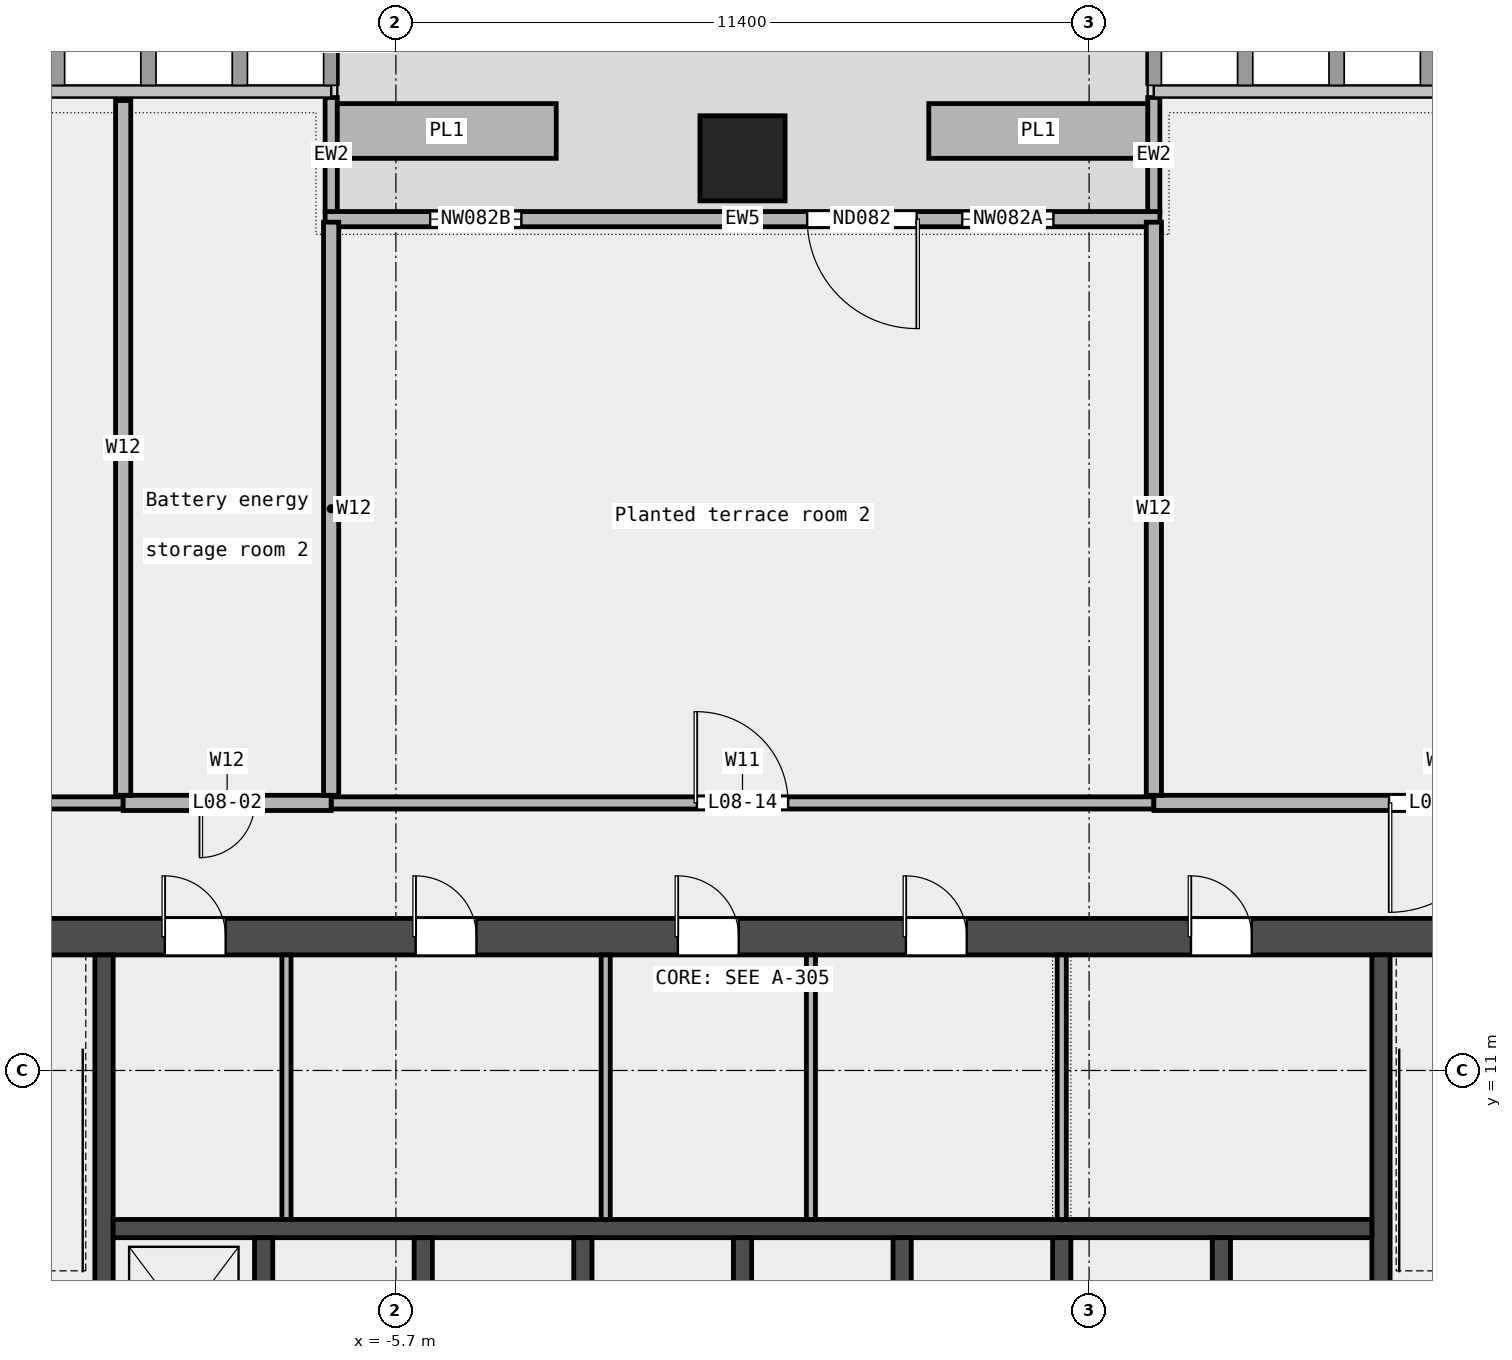
"""IFC4 building model, lengths in metres.
Left out: names, types, materials, properties, quantities, classifications, styles, units other than length and angle.
Written with IfcOpenShell. Run it as: python <this file> out.ifc"""

import sys

from ifc_helpers import new_model, si_unit, direction, frame, frame_2d, origin, origin_2d, place, context, subcontext, project, spatial, rectangle, extrude, element, fill, save


model = new_model("IFC4")
c1 = context("Model", 3, precision=1e-05, world=origin(), true_north=direction((0.0, 1.0)))
c2 = subcontext(c1, "Body", "Model", "MODEL_VIEW")
j1 = project(units=[si_unit("LENGTHUNIT", "METRE"), si_unit("PLANEANGLEUNIT", "RADIAN")], contexts=[c1])
p1 = place(None, origin())
s1 = spatial("IfcSite", under=j1, at=p1, CompositionType="ELEMENT")
p2 = place(p1, origin())
s2 = spatial("IfcBuilding", under=s1, at=p2, CompositionType="ELEMENT")
p3 = place(p2, frame((0.0, 0.0, 45.4)))
s3 = spatial("IfcBuildingStorey", under=s2, at=p3, CompositionType="ELEMENT", Elevation=45.4)
p4 = place(p3, frame((0.0, 26.0, 0.0), z_axis=(0.0, 0.0, 1.0), x_axis=(1.0, 0.0, 0.0)))
e1 = element("IfcColumn", 1, at=p4, inside=s3, PredefinedType="COLUMN", context=c2, shape_type="SweptSolid", body=[
    extrude(rectangle(XDim=1.4, YDim=1.4, at=origin_2d()), origin(), (0.0, 0.0, 1.0), 4.35),
])
p5 = place(p3, frame((6.864, 25.0, 0.0), z_axis=(0.0, 0.0, 1.0), x_axis=(-1.0, 0.0, 0.0)))
e2 = element("IfcWall", 2, at=p5, inside=s3, PredefinedType="STANDARD", context=c2, shape_type="SweptSolid", body=[
    extrude(rectangle(XDim=13.727, YDim=0.25, at=frame_2d((6.864, 0.0))), origin(), (0.0, 0.0, 1.0), 4.35),
])
p6 = place(p5, frame((1.75, 0.0, 0.45)))
e3 = element("IfcOpeningElement", 3, at=p6, cuts=e2, PredefinedType="OPENING", context=c2, shape_type="SweptSolid", body=[
    extrude(rectangle(XDim=1.5, YDim=3.0, at=frame_2d((0.75, 1.5))), frame((0.0, 0.137, 0.0), z_axis=(0.0, -1.0, 0.0), x_axis=(1.0, 0.0, 0.0)), (0.0, 0.0, 1.0), 0.274),
])
p7 = place(p5, frame((4.0, 0.0, 0.0)))
e4 = element("IfcOpeningElement", 4, at=p7, cuts=e2, PredefinedType="OPENING", context=c2, shape_type="SweptSolid", body=[
    extrude(rectangle(XDim=1.8, YDim=2.4, at=frame_2d((0.9, 1.2))), frame((0.0, 0.137, 0.0), z_axis=(0.0, -1.0, 0.0), x_axis=(1.0, 0.0, 0.0)), (0.0, 0.0, 1.0), 0.274),
])
p8 = place(p5, frame((10.5, 0.0, 0.45)))
e5 = element("IfcOpeningElement", 5, at=p8, cuts=e2, PredefinedType="OPENING", context=c2, shape_type="SweptSolid", body=[
    extrude(rectangle(XDim=1.5, YDim=3.0, at=frame_2d((0.75, 1.5))), frame((0.0, 0.137, 0.0), z_axis=(0.0, -1.0, 0.0), x_axis=(1.0, 0.0, 0.0)), (0.0, 0.0, 1.0), 0.274),
])
for number, where, z_axis, x_axis in (
    (6, (6.764, 27.0, 0.0), (0.0, 0.0, 1.0), (0.0, -1.0, 0.0)),
    (7, (-6.764, 27.0, 0.0), (0.0, 0.0, 1.0), (0.0, -1.0, 0.0)),
):
    element("IfcWall", number, at=place(p3, frame(where, z_axis=z_axis, x_axis=x_axis)), inside=s3, PredefinedType="STANDARD", context=c2, shape_type="SweptSolid", body=[
        extrude(rectangle(XDim=1.875, YDim=0.2, at=frame_2d((0.938, 0.0))), origin(), (0.0, 0.0, 1.0), 4.35),
    ])
for number, where, z_axis, x_axis in (
    (8, (6.664, 26.45, 0.0), (0.0, 0.0, 1.0), (-1.0, 0.0, 0.0)),
    (9, (-3.064, 26.45, 0.0), (0.0, 0.0, 1.0), (-1.0, 0.0, 0.0)),
):
    element("IfcWall", number, at=place(p3, frame(where, z_axis=z_axis, x_axis=x_axis)), inside=s3, PredefinedType="STANDARD", context=c2, shape_type="SweptSolid", body=[
        extrude(rectangle(XDim=3.6, YDim=0.9, at=frame_2d((1.8, 0.0))), origin(), (0.0, 0.0, 1.0), 0.7),
    ])
p9 = place(p3, frame((-16.3, 15.4, 0.0), z_axis=(0.0, 0.0, 1.0), x_axis=(1.0, 0.0, 0.0)))
e10 = element("IfcWall", 10, at=p9, inside=s3, PredefinedType="PARTITIONING", context=c2, shape_type="SweptSolid", body=[
    extrude(rectangle(XDim=6.115, YDim=0.2, at=frame_2d((3.058, 0.0))), origin(), (0.0, 0.0, 1.0), 4.35),
])
p10 = place(p9, frame((2.157, 0.0, 0.0)))
e11 = element("IfcOpeningElement", 11, at=p10, cuts=e10, PredefinedType="OPENING", context=c2, shape_type="SweptSolid", body=[
    extrude(rectangle(XDim=1.8, YDim=2.1, at=frame_2d((0.9, 1.05))), frame((0.0, 0.112, 0.0), z_axis=(0.0, -1.0, 0.0), x_axis=(1.0, 0.0, 0.0)), (0.0, 0.0, 1.0), 0.224),
])
p11 = place(p3, frame((-6.765, 15.4, 0.0), z_axis=(0.0, 0.0, 1.0), x_axis=(1.0, 0.0, 0.0)))
e12 = element("IfcWall", 12, at=p11, inside=s3, PredefinedType="PARTITIONING", context=c2, shape_type="SweptSolid", body=[
    extrude(rectangle(XDim=13.53, YDim=0.2, at=frame_2d((6.765, 0.0))), origin(), (0.0, 0.0, 1.0), 4.35),
])
p12 = place(p11, frame((6.015, 0.0, 0.0)))
e13 = element("IfcOpeningElement", 13, at=p12, cuts=e12, PredefinedType="OPENING", context=c2, shape_type="SweptSolid", body=[
    extrude(rectangle(XDim=1.5, YDim=2.1, at=frame_2d((0.75, 1.05))), frame((0.0, 0.112, 0.0), z_axis=(0.0, -1.0, 0.0), x_axis=(1.0, 0.0, 0.0)), (0.0, 0.0, 1.0), 0.224),
])
p13 = place(p3, frame((-10.185, 15.4, 0.0), z_axis=(0.0, 0.0, 1.0), x_axis=(1.0, 0.0, 0.0)))
e14 = element("IfcWall", 14, at=p13, inside=s3, PredefinedType="PARTITIONING", context=c2, shape_type="SweptSolid", body=[
    extrude(rectangle(XDim=3.42, YDim=0.25, at=frame_2d((1.71, 0.0))), origin(), (0.0, 0.0, 1.0), 4.35),
])
p14 = place(p13, frame((1.26, 0.0, 0.0)))
e15 = element("IfcOpeningElement", 15, at=p14, cuts=e14, PredefinedType="OPENING", context=c2, shape_type="SweptSolid", body=[
    extrude(rectangle(XDim=0.9, YDim=2.1, at=frame_2d((0.45, 1.05))), frame((0.0, 0.137, 0.0), z_axis=(0.0, -1.0, 0.0), x_axis=(1.0, 0.0, 0.0)), (0.0, 0.0, 1.0), 0.274),
])
p15 = place(p3, frame((6.765, 15.4, 0.0), z_axis=(0.0, 0.0, 1.0), x_axis=(1.0, 0.0, 0.0)))
e16 = element("IfcWall", 16, at=p15, inside=s3, PredefinedType="PARTITIONING", context=c2, shape_type="SweptSolid", body=[
    extrude(rectangle(XDim=9.535, YDim=0.25, at=frame_2d((4.768, 0.0))), origin(), (0.0, 0.0, 1.0), 4.35),
])
p16 = place(p15, frame((3.867, 0.0, 0.0)))
e17 = element("IfcOpeningElement", 17, at=p16, cuts=e16, PredefinedType="OPENING", context=c2, shape_type="SweptSolid", body=[
    extrude(rectangle(XDim=1.8, YDim=2.1, at=frame_2d((0.9, 1.05))), frame((0.0, 0.137, 0.0), z_axis=(0.0, -1.0, 0.0), x_axis=(1.0, 0.0, 0.0)), (0.0, 0.0, 1.0), 0.274),
])
p17 = place(p3, frame((-10.185, 15.525, 0.0), z_axis=(0.0, 0.0, 1.0), x_axis=(0.0, 1.0, 0.0)))
e18 = element("IfcWall", 18, at=p17, inside=s3, PredefinedType="PARTITIONING", context=c2, shape_type="SweptSolid", body=[
    extrude(rectangle(XDim=11.425, YDim=0.25, at=frame_2d((5.712, 0.0))), origin(), (0.0, 0.0, 1.0), 4.35),
])
for number, where, z_axis, x_axis in (
    (19, (-6.765, 15.525, 0.0), (0.0, 0.0, 1.0), (0.0, 1.0, 0.0)),
    (20, (6.765, 15.525, 0.0), (0.0, 0.0, 1.0), (0.0, 1.0, 0.0)),
):
    element("IfcWall", number, at=place(p3, frame(where, z_axis=z_axis, x_axis=x_axis)), inside=s3, PredefinedType="PARTITIONING", context=c2, shape_type="SweptSolid", body=[
        extrude(rectangle(XDim=9.425, YDim=0.25, at=frame_2d((4.712, 0.0))), origin(), (0.0, 0.0, 1.0), 4.35),
    ])
p18 = place(p3, frame((-14.4, 13.2, 0.0), z_axis=(0.0, 0.0, 1.0), x_axis=(1.0, 0.0, 0.0)))
e21 = element("IfcWall", 21, at=p18, inside=s3, PredefinedType="SHEAR", context=c2, shape_type="SweptSolid", body=[
    extrude(rectangle(XDim=28.8, YDim=0.6, at=frame_2d((14.4, 0.0))), origin(), (0.0, 0.0, 1.0), 4.5),
])
p19 = place(p18, frame((4.9, 0.0, 0.0)))
e22 = element("IfcOpeningElement", 22, at=p19, cuts=e21, PredefinedType="OPENING", context=c2, shape_type="SweptSolid", body=[
    extrude(rectangle(XDim=1.0, YDim=2.1, at=frame_2d((0.5, 1.05))), frame((0.0, 0.312, 0.0), z_axis=(0.0, -1.0, 0.0), x_axis=(1.0, 0.0, 0.0)), (0.0, 0.0, 1.0), 0.624),
])
p20 = place(p18, frame((9.025, 0.0, 0.0)))
e23 = element("IfcOpeningElement", 23, at=p20, cuts=e21, PredefinedType="OPENING", context=c2, shape_type="SweptSolid", body=[
    extrude(rectangle(XDim=1.0, YDim=2.1, at=frame_2d((0.5, 1.05))), frame((0.0, 0.312, 0.0), z_axis=(0.0, -1.0, 0.0), x_axis=(1.0, 0.0, 0.0)), (0.0, 0.0, 1.0), 0.624),
])
p21 = place(p18, frame((13.337, 0.0, 0.0)))
e24 = element("IfcOpeningElement", 24, at=p21, cuts=e21, PredefinedType="OPENING", context=c2, shape_type="SweptSolid", body=[
    extrude(rectangle(XDim=1.0, YDim=2.1, at=frame_2d((0.5, 1.05))), frame((0.0, 0.312, 0.0), z_axis=(0.0, -1.0, 0.0), x_axis=(1.0, 0.0, 0.0)), (0.0, 0.0, 1.0), 0.624),
])
p22 = place(p18, frame((17.087, 0.0, 0.0)))
e25 = element("IfcOpeningElement", 25, at=p22, cuts=e21, PredefinedType="OPENING", context=c2, shape_type="SweptSolid", body=[
    extrude(rectangle(XDim=1.0, YDim=2.1, at=frame_2d((0.5, 1.05))), frame((0.0, 0.312, 0.0), z_axis=(0.0, -1.0, 0.0), x_axis=(1.0, 0.0, 0.0)), (0.0, 0.0, 1.0), 0.624),
])
p23 = place(p18, frame((21.775, 0.0, 0.0)))
e26 = element("IfcOpeningElement", 26, at=p23, cuts=e21, PredefinedType="OPENING", context=c2, shape_type="SweptSolid", body=[
    extrude(rectangle(XDim=1.0, YDim=2.1, at=frame_2d((0.5, 1.05))), frame((0.0, 0.312, 0.0), z_axis=(0.0, -1.0, 0.0), x_axis=(1.0, 0.0, 0.0)), (0.0, 0.0, 1.0), 0.624),
])
for number, where, z_axis, x_axis in (
    (27, (-10.5, 5.25, 0.0), (0.0, 0.0, 1.0), (0.0, 1.0, 0.0)),
    (28, (10.5, 5.25, 0.0), (0.0, 0.0, 1.0), (0.0, 1.0, 0.0)),
):
    element("IfcWall", number, at=place(p3, frame(where, z_axis=z_axis, x_axis=x_axis)), inside=s3, PredefinedType="SHEAR", context=c2, shape_type="SweptSolid", body=[
        extrude(rectangle(XDim=7.65, YDim=0.3, at=frame_2d((3.825, 0.0))), origin(), (0.0, 0.0, 1.0), 4.5),
    ])
p24 = place(p3, frame((-10.35, 8.4, 0.0), z_axis=(0.0, 0.0, 1.0), x_axis=(1.0, 0.0, 0.0)))
e29 = element("IfcWall", 29, at=p24, inside=s3, PredefinedType="SOLIDWALL", context=c2, shape_type="SweptSolid", body=[
    extrude(rectangle(XDim=20.7, YDim=0.3, at=frame_2d((10.35, 0.0))), origin(), (0.0, 0.0, 1.0), 4.5),
])
for number, where, z_axis, x_axis in (
    (30, (-7.875, 5.55, 0.0), (0.0, 0.0, 1.0), (0.0, 1.0, 0.0)),
    (31, (-5.25, 5.55, 0.0), (0.0, 0.0, 1.0), (0.0, 1.0, 0.0)),
    (32, (-2.625, 5.55, 0.0), (0.0, 0.0, 1.0), (0.0, 1.0, 0.0)),
    (33, (0.0, 5.55, 0.0), (0.0, 0.0, 1.0), (0.0, 1.0, 0.0)),
    (34, (2.625, 5.55, 0.0), (0.0, 0.0, 1.0), (0.0, 1.0, 0.0)),
    (35, (5.25, 5.55, 0.0), (0.0, 0.0, 1.0), (0.0, 1.0, 0.0)),
    (36, (7.875, 5.55, 0.0), (0.0, 0.0, 1.0), (0.0, 1.0, 0.0)),
):
    element("IfcWall", number, at=place(p3, frame(where, z_axis=z_axis, x_axis=x_axis)), inside=s3, PredefinedType="SOLIDWALL", context=c2, shape_type="SweptSolid", body=[
        extrude(rectangle(XDim=2.7, YDim=0.3, at=frame_2d((1.35, 0.0))), origin(), (0.0, 0.0, 1.0), 4.5),
    ])
for number, where, z_axis, x_axis in (
    (37, (-7.5, 8.55, 0.0), (0.0, 0.0, 1.0), (0.0, 1.0, 0.0)),
    (38, (-2.25, 8.55, 0.0), (0.0, 0.0, 1.0), (0.0, 1.0, 0.0)),
    (39, (1.125, 8.55, 0.0), (0.0, 0.0, 1.0), (0.0, 1.0, 0.0)),
    (40, (5.25, 8.55, 0.0), (0.0, 0.0, 1.0), (0.0, 1.0, 0.0)),
):
    element("IfcWall", number, at=place(p3, frame(where, z_axis=z_axis, x_axis=x_axis)), inside=s3, PredefinedType="PARTITIONING", context=c2, shape_type="SweptSolid", body=[
        extrude(rectangle(XDim=4.35, YDim=0.15, at=frame_2d((2.175, 0.0))), origin(), (0.0, 0.0, 1.0), 4.5),
    ])
p25 = place(p6, origin())
e41 = element("IfcWindow", 41, at=p25, inside=s3, PartitioningType="SINGLE_PANEL", PredefinedType="WINDOW", context=c2, shape_type="SweptSolid", body=[
    extrude(rectangle(XDim=1.5, YDim=3.0, at=frame_2d((0.75, 1.5))), frame((0.0, 0.03, 0.0), z_axis=(0.0, -1.0, 0.0), x_axis=(1.0, 0.0, 0.0)), (0.0, 0.0, 1.0), 0.06),
])
fill(e3, e41)
p26 = place(p7, origin())
e42 = element("IfcDoor", 42, at=p26, inside=s3, OperationType="DOUBLE_DOOR_SINGLE_SWING", PredefinedType="DOOR", context=c2, shape_type="SweptSolid", body=[
    extrude(rectangle(XDim=1.8, YDim=2.4, at=frame_2d((0.9, 1.2))), frame((0.0, 0.025, 0.0), z_axis=(0.0, -1.0, 0.0), x_axis=(1.0, 0.0, 0.0)), (0.0, 0.0, 1.0), 0.05),
])
fill(e4, e42)
p27 = place(p8, origin())
e43 = element("IfcWindow", 43, at=p27, inside=s3, PartitioningType="SINGLE_PANEL", PredefinedType="WINDOW", context=c2, shape_type="SweptSolid", body=[
    extrude(rectangle(XDim=1.5, YDim=3.0, at=frame_2d((0.75, 1.5))), frame((0.0, 0.03, 0.0), z_axis=(0.0, -1.0, 0.0), x_axis=(1.0, 0.0, 0.0)), (0.0, 0.0, 1.0), 0.06),
])
fill(e5, e43)
p28 = place(p14, origin())
e44 = element("IfcDoor", 44, at=p28, inside=s3, OperationType="SINGLE_SWING_RIGHT", PredefinedType="DOOR", context=c2, shape_type="SweptSolid", body=[
    extrude(rectangle(XDim=0.9, YDim=2.1, at=frame_2d((0.45, 1.05))), frame((0.0, 0.025, 0.0), z_axis=(0.0, -1.0, 0.0), x_axis=(1.0, 0.0, 0.0)), (0.0, 0.0, 1.0), 0.05),
])
fill(e15, e44)
p29 = place(p16, origin())
e45 = element("IfcDoor", 45, at=p29, inside=s3, OperationType="DOUBLE_DOOR_SINGLE_SWING", PredefinedType="DOOR", context=c2, shape_type="SweptSolid", body=[
    extrude(rectangle(XDim=1.8, YDim=2.1, at=frame_2d((0.9, 1.05))), frame((0.0, 0.025, 0.0), z_axis=(0.0, -1.0, 0.0), x_axis=(1.0, 0.0, 0.0)), (0.0, 0.0, 1.0), 0.05),
])
fill(e17, e45)
p30 = place(p12, origin())
e46 = element("IfcDoor", 46, at=p30, inside=s3, OperationType="DOUBLE_DOOR_SINGLE_SWING", PredefinedType="DOOR", context=c2, shape_type="SweptSolid", body=[
    extrude(rectangle(XDim=1.5, YDim=2.1, at=frame_2d((0.75, 1.05))), frame((0.0, 0.025, 0.0), z_axis=(0.0, -1.0, 0.0), x_axis=(1.0, 0.0, 0.0)), (0.0, 0.0, 1.0), 0.05),
])
fill(e13, e46)
p31 = place(p19, origin())
e47 = element("IfcDoor", 47, at=p31, inside=s3, OperationType="SINGLE_SWING_LEFT", PredefinedType="DOOR", context=c2, shape_type="SweptSolid", body=[
    extrude(rectangle(XDim=1.0, YDim=2.1, at=frame_2d((0.5, 1.05))), frame((0.0, 0.025, 0.0), z_axis=(0.0, -1.0, 0.0), x_axis=(1.0, 0.0, 0.0)), (0.0, 0.0, 1.0), 0.05),
])
fill(e22, e47)
p32 = place(p20, origin())
e48 = element("IfcDoor", 48, at=p32, inside=s3, OperationType="SINGLE_SWING_LEFT", PredefinedType="DOOR", context=c2, shape_type="SweptSolid", body=[
    extrude(rectangle(XDim=1.0, YDim=2.1, at=frame_2d((0.5, 1.05))), frame((0.0, 0.025, 0.0), z_axis=(0.0, -1.0, 0.0), x_axis=(1.0, 0.0, 0.0)), (0.0, 0.0, 1.0), 0.05),
])
fill(e23, e48)
p33 = place(p21, origin())
e49 = element("IfcDoor", 49, at=p33, inside=s3, OperationType="SINGLE_SWING_LEFT", PredefinedType="DOOR", context=c2, shape_type="SweptSolid", body=[
    extrude(rectangle(XDim=1.0, YDim=2.1, at=frame_2d((0.5, 1.05))), frame((0.0, 0.025, 0.0), z_axis=(0.0, -1.0, 0.0), x_axis=(1.0, 0.0, 0.0)), (0.0, 0.0, 1.0), 0.05),
])
fill(e24, e49)
p34 = place(p22, origin())
e50 = element("IfcDoor", 50, at=p34, inside=s3, OperationType="SINGLE_SWING_LEFT", PredefinedType="DOOR", context=c2, shape_type="SweptSolid", body=[
    extrude(rectangle(XDim=1.0, YDim=2.1, at=frame_2d((0.5, 1.05))), frame((0.0, 0.025, 0.0), z_axis=(0.0, -1.0, 0.0), x_axis=(1.0, 0.0, 0.0)), (0.0, 0.0, 1.0), 0.05),
])
fill(e25, e50)
p35 = place(p23, origin())
e51 = element("IfcDoor", 51, at=p35, inside=s3, OperationType="SINGLE_SWING_LEFT", PredefinedType="DOOR", context=c2, shape_type="SweptSolid", body=[
    extrude(rectangle(XDim=1.0, YDim=2.1, at=frame_2d((0.5, 1.05))), frame((0.0, 0.025, 0.0), z_axis=(0.0, -1.0, 0.0), x_axis=(1.0, 0.0, 0.0)), (0.0, 0.0, 1.0), 0.05),
])
fill(e26, e51)
save(model, sys.argv[1])
